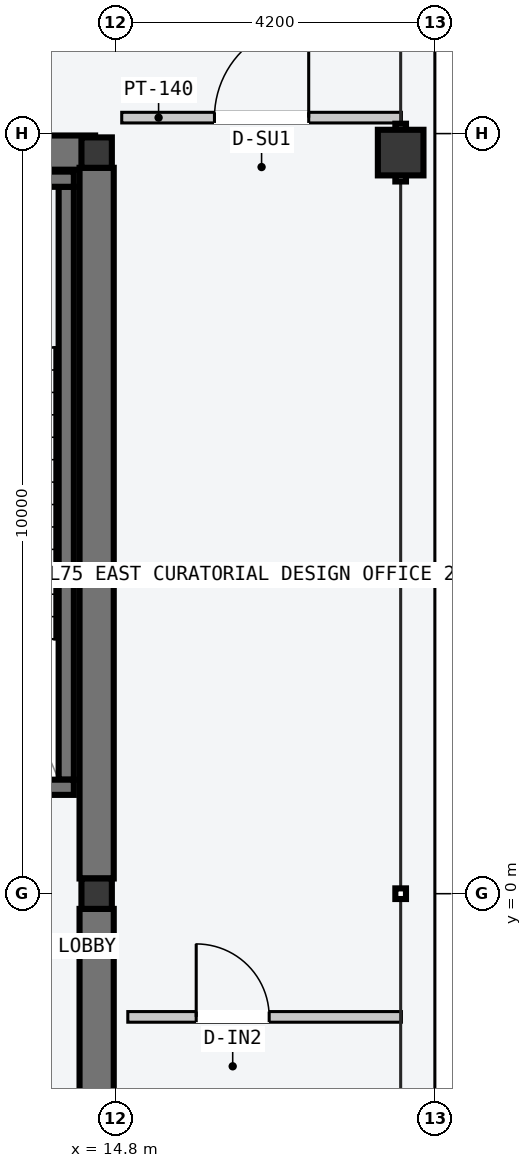
"""IFC4 building model, lengths in metres.
Left out: names, types, materials, properties, quantities, classifications, styles, units other than length and angle.
Written with IfcOpenShell. Run it as: python <this file> out.ifc"""

import sys

from ifc_helpers import new_model, si_unit, direction, frame, frame_2d, origin, origin_2d, place, context, subcontext, project, spatial, rectangle, hollow_rectangle, i_section, extrude, element, fill, save


model = new_model("IFC4")
c1 = context("Model", 3, precision=1e-05, world=origin(), true_north=direction((0.0, 1.0)))
c2 = subcontext(c1, "Body", "Model", "MODEL_VIEW")
j1 = project(units=[si_unit("LENGTHUNIT", "METRE"), si_unit("PLANEANGLEUNIT", "RADIAN")], contexts=[c1])
p1 = place(None, origin())
s1 = spatial("IfcSite", under=j1, at=p1, CompositionType="ELEMENT")
p2 = place(p1, origin())
s2 = spatial("IfcBuilding", under=s1, at=p2, CompositionType="ELEMENT")
p3 = place(p2, frame((0.0, 0.0, 284.4)))
s3 = spatial("IfcBuildingStorey", under=s2, at=p3, CompositionType="ELEMENT", Elevation=284.4)
p4 = place(p3, frame((8.07, 9.75, -0.2), z_axis=(0.0, 0.0, 1.0), x_axis=(1.0, 0.0, 0.0)))
e1 = element("IfcWall", 1, at=p4, inside=s3, PredefinedType="SHEAR", context=c2, shape_type="SweptSolid", body=[
    extrude(rectangle(XDim=6.46, YDim=0.45, at=frame_2d((3.23, 0.0))), origin(), (0.0, 0.0, 1.0), 4.8),
])
for number, where, z_axis, x_axis in (
    (2, (14.55, -9.55, -0.2), (0.0, 0.0, 1.0), (0.0, 1.0, 0.0)),
    (3, (14.55, 0.2, -0.2), (0.0, 0.0, 1.0), (0.0, 1.0, 0.0)),
):
    element("IfcWall", number, at=place(p3, frame(where, z_axis=z_axis, x_axis=x_axis)), inside=s3, PredefinedType="SHEAR", context=c2, shape_type="SweptSolid", body=[
        extrude(rectangle(XDim=9.35, YDim=0.45, at=frame_2d((4.675, 0.0))), origin(), (0.0, 0.0, 1.0), 4.8),
    ])
p5 = place(p3, frame((14.15, 1.5, -0.2), z_axis=(0.0, 0.0, 1.0), x_axis=(0.0, 1.0, 0.0)))
e4 = element("IfcWall", 4, at=p5, inside=s3, PredefinedType="SOLIDWALL", context=c2, shape_type="SweptSolid", body=[
    extrude(rectangle(XDim=7.8, YDim=0.2, at=frame_2d((3.9, 0.0))), origin(), (0.0, 0.0, 1.0), 4.8),
])
p6 = place(p3, frame((10.53, 1.4, -0.2), z_axis=(0.0, 0.0, 1.0), x_axis=(1.0, 0.0, 0.0)))
e5 = element("IfcWall", 5, at=p6, inside=s3, PredefinedType="SOLIDWALL", context=c2, shape_type="SweptSolid", body=[
    extrude(rectangle(XDim=3.72, YDim=0.2, at=frame_2d((1.86, 0.0))), origin(), (0.0, 0.0, 1.0), 4.8),
])
p7 = place(p6, frame((1.5, 0.0, 0.2)))
e6 = element("IfcOpeningElement", 6, at=p7, cuts=e5, PredefinedType="OPENING", context=c2, shape_type="SweptSolid", body=[
    extrude(rectangle(XDim=1.12, YDim=2.18, at=frame_2d((0.56, 1.09))), frame((0.0, 0.11, 0.0), z_axis=(0.0, -1.0, 0.0), x_axis=(1.0, 0.0, 0.0)), (0.0, 0.0, 1.0), 0.22),
])
p8 = place(p3, frame((10.53, 9.4, -0.2), z_axis=(0.0, 0.0, 1.0), x_axis=(1.0, 0.0, 0.0)))
e7 = element("IfcWall", 7, at=p8, inside=s3, PredefinedType="SOLIDWALL", context=c2, shape_type="SweptSolid", body=[
    extrude(rectangle(XDim=3.72, YDim=0.2, at=frame_2d((1.86, 0.0))), origin(), (0.0, 0.0, 1.0), 4.8),
])
for number, where, z_axis, x_axis in (
    (8, (14.55, 0.0, 0.0), (0.0, 0.0, 1.0), (1.0, 0.0, 0.0)),
    (9, (14.55, 9.75, 0.0), (0.0, 0.0, 1.0), (1.0, 0.0, 0.0)),
):
    element("IfcColumn", number, at=place(p3, frame(where, z_axis=z_axis, x_axis=x_axis)), inside=s3, PredefinedType="COLUMN", context=c2, shape_type="SweptSolid", body=[
        extrude(i_section(OverallWidth=0.4, OverallDepth=0.4, WebThickness=0.013, FlangeThickness=0.021, at=origin_2d()), origin(), (0.0, 0.0, 1.0), 4.8),
    ])
p9 = place(p3, frame((18.55, 9.75, 0.0), z_axis=(0.0, 0.0, 1.0), x_axis=(0.0, 1.0, 0.0)))
e10 = element("IfcColumn", 10, at=p9, inside=s3, PredefinedType="COLUMN", context=c2, shape_type="SweptSolid", body=[
    extrude(hollow_rectangle(XDim=0.6, YDim=0.6, WallThickness=0.025, at=origin_2d()), origin(), (0.0, 0.0, 1.0), 4.8),
])
p10 = place(p3, frame((14.88, 10.21, 0.0), z_axis=(0.0, 0.0, 1.0), x_axis=(1.0, 0.0, 0.0)))
e11 = element("IfcWall", 11, at=p10, inside=s3, PredefinedType="PARTITIONING", context=c2, shape_type="SweptSolid", body=[
    extrude(rectangle(XDim=3.68, YDim=0.14, at=frame_2d((1.84, 0.0))), origin(), (0.0, 0.0, 1.0), 4.6),
])
p11 = place(p10, frame((1.22, 0.0, 0.0)))
e12 = element("IfcOpeningElement", 12, at=p11, cuts=e11, PredefinedType="OPENING", context=c2, shape_type="SweptSolid", body=[
    extrude(rectangle(XDim=1.24, YDim=2.24, at=frame_2d((0.62, 1.12))), frame((0.0, 0.08, 0.0), z_axis=(0.0, -1.0, 0.0), x_axis=(1.0, 0.0, 0.0)), (0.0, 0.0, 1.0), 0.16),
])
p12 = place(p3, frame((14.96, -1.621, 0.0), z_axis=(0.0, 0.0, 1.0), x_axis=(1.0, 0.0, 0.0)))
e13 = element("IfcWall", 13, at=p12, inside=s3, PredefinedType="PARTITIONING", context=c2, shape_type="SweptSolid", body=[
    extrude(rectangle(XDim=3.6, YDim=0.14, at=frame_2d((1.8, 0.0))), origin(), (0.0, 0.0, 1.0), 4.6),
])
p13 = place(p12, frame((0.9, 0.0, 0.0)))
e14 = element("IfcOpeningElement", 14, at=p13, cuts=e13, PredefinedType="OPENING", context=c2, shape_type="SweptSolid", body=[
    extrude(rectangle(XDim=0.96, YDim=2.18, at=frame_2d((0.48, 1.09))), frame((0.0, 0.08, 0.0), z_axis=(0.0, -1.0, 0.0), x_axis=(1.0, 0.0, 0.0)), (0.0, 0.0, 1.0), 0.16),
])
p14 = place(p11, origin())
e15 = element("IfcDoor", 15, at=p14, inside=s3, OperationType="SINGLE_SWING_RIGHT", PredefinedType="DOOR", context=c2, shape_type="SweptSolid", body=[
    extrude(rectangle(XDim=1.24, YDim=2.24, at=frame_2d((0.62, 1.12))), frame((0.0, 0.025, 0.0), z_axis=(0.0, -1.0, 0.0), x_axis=(1.0, 0.0, 0.0)), (0.0, 0.0, 1.0), 0.05),
])
fill(e12, e15)
p15 = place(p13, origin())
e16 = element("IfcDoor", 16, at=p15, inside=s3, OperationType="SINGLE_SWING_LEFT", PredefinedType="DOOR", context=c2, shape_type="SweptSolid", body=[
    extrude(rectangle(XDim=0.96, YDim=2.18, at=frame_2d((0.48, 1.09))), frame((0.0, 0.025, 0.0), z_axis=(0.0, -1.0, 0.0), x_axis=(1.0, 0.0, 0.0)), (0.0, 0.0, 1.0), 0.05),
])
fill(e14, e16)
save(model, sys.argv[1])
